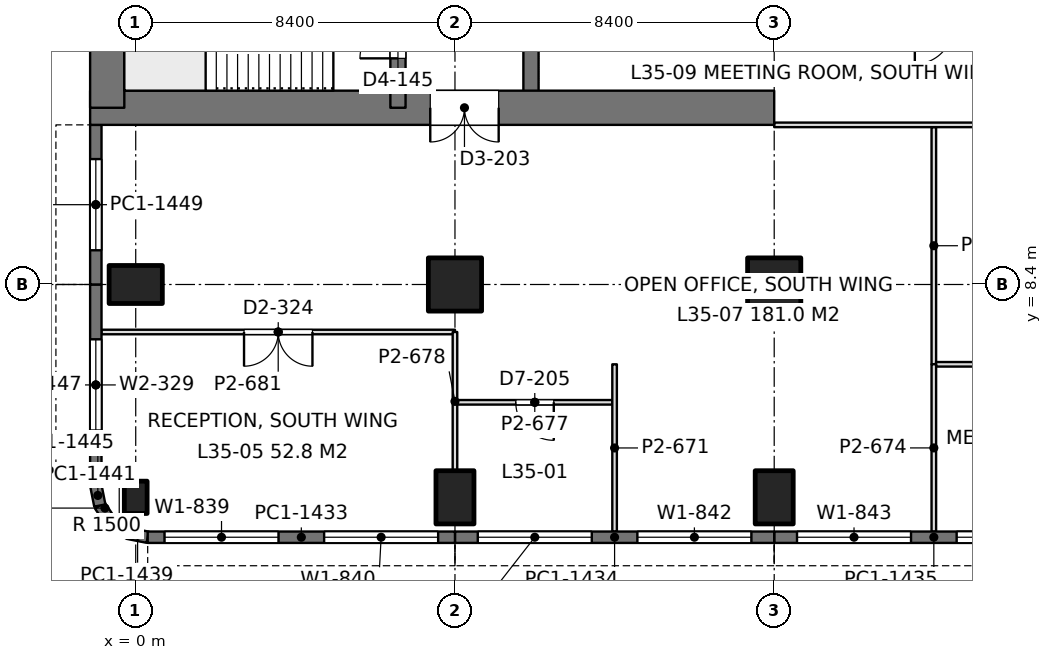
"""IFC4 building model, lengths in metres.
Left out: names, types, materials, properties, quantities, classifications, styles, units other than length and angle.
Written with IfcOpenShell. Run it as: python <this file> out.ifc"""

import sys

from ifc_helpers import new_model, si_unit, direction, frame, frame_2d, origin, origin_2d, place, context, subcontext, project, spatial, rectangle, extrude, element, fill, save


model = new_model("IFC4")
c1 = context("Model", 3, precision=1e-05, world=origin(), true_north=direction((0.0, 1.0)))
c2 = subcontext(c1, "Body", "Model", "MODEL_VIEW")
j1 = project(units=[si_unit("LENGTHUNIT", "METRE"), si_unit("PLANEANGLEUNIT", "RADIAN")], contexts=[c1])
p1 = place(None, origin())
s1 = spatial("IfcSite", under=j1, at=p1, CompositionType="ELEMENT")
p2 = place(p1, origin())
s2 = spatial("IfcBuilding", under=s1, at=p2, CompositionType="ELEMENT")
p3 = place(p2, frame((0.0, 0.0, 155.4)))
s3 = spatial("IfcBuildingStorey", under=s2, at=p3, CompositionType="ELEMENT", Elevation=155.4)
p4 = place(p3, frame((0.0, 2.8, 0.0), z_axis=(0.0, 0.0, 1.0), x_axis=(1.0, 0.0, 0.0)))
e1 = element("IfcColumn", 1, at=p4, inside=s3, PredefinedType="COLUMN", context=c2, shape_type="SweptSolid", body=[
    extrude(rectangle(XDim=0.6, YDim=0.85, at=origin_2d()), origin(), (0.0, 0.0, 1.0), 4.2),
])
for number, where, z_axis, x_axis in (
    (2, (0.0, 8.4, 0.0), (0.0, 0.0, 1.0), (0.0, 1.0, 0.0)),
    (3, (8.4, 2.8, 0.0), (0.0, 0.0, 1.0), (1.0, 0.0, 0.0)),
):
    element("IfcColumn", number, at=place(p3, frame(where, z_axis=z_axis, x_axis=x_axis)), inside=s3, PredefinedType="COLUMN", context=c2, shape_type="SweptSolid", body=[
        extrude(rectangle(XDim=1.0, YDim=1.4, at=origin_2d()), origin(), (0.0, 0.0, 1.0), 4.2),
    ])
p5 = place(p3, frame((8.4, 8.4, 0.0), z_axis=(0.0, 0.0, 1.0), x_axis=(1.0, 0.0, 0.0)))
e4 = element("IfcColumn", 4, at=p5, inside=s3, PredefinedType="COLUMN", context=c2, shape_type="SweptSolid", body=[
    extrude(rectangle(XDim=1.4, YDim=1.4, at=origin_2d()), origin(), (0.0, 0.0, 1.0), 4.2),
])
p6 = place(p3, frame((16.8, 2.8, 0.0), z_axis=(0.0, 0.0, 1.0), x_axis=(1.0, 0.0, 0.0)))
e5 = element("IfcColumn", 5, at=p6, inside=s3, PredefinedType="COLUMN", context=c2, shape_type="SweptSolid", body=[
    extrude(rectangle(XDim=1.0, YDim=1.4, at=origin_2d()), origin(), (0.0, 0.0, 1.0), 4.2),
])
p7 = place(p3, frame((16.8, 8.4, 0.0), z_axis=(0.0, 0.0, 1.0), x_axis=(1.0, 0.0, 0.0)))
e6 = element("IfcColumn", 6, at=p7, inside=s3, PredefinedType="COLUMN", context=c2, shape_type="SweptSolid", body=[
    extrude(rectangle(XDim=1.4, YDim=1.4, at=origin_2d()), origin(), (0.0, 0.0, 1.0), 4.2),
])
p8 = place(p3, frame((-1.2, 13.05, 0.0), z_axis=(0.0, 0.0, 1.0), x_axis=(1.0, 0.0, 0.0)))
e7 = element("IfcWall", 7, at=p8, inside=s3, PredefinedType="SHEAR", context=c2, shape_type="SweptSolid", body=[
    extrude(rectangle(XDim=18.0, YDim=0.9, at=frame_2d((9.0, 0.0))), origin(), (0.0, 0.0, 1.0), 4.2),
])
p9 = place(p8, frame((8.95, 0.0, 0.0)))
e8 = element("IfcOpeningElement", 8, at=p9, cuts=e7, PredefinedType="OPENING", context=c2, shape_type="SweptSolid", body=[
    extrude(rectangle(XDim=1.8, YDim=2.4, at=frame_2d((0.9, 1.2))), frame((0.0, 0.46, 0.0), z_axis=(0.0, -1.0, 0.0), x_axis=(1.0, 0.0, 0.0)), (0.0, 0.0, 1.0), 0.92),
])
p10 = place(p3, frame((-0.75, 13.05, 0.0), z_axis=(0.0, 0.0, 1.0), x_axis=(0.0, 1.0, 0.0)))
e9 = element("IfcWall", 9, at=p10, inside=s3, PredefinedType="SHEAR", context=c2, shape_type="SweptSolid", body=[
    extrude(rectangle(XDim=24.3, YDim=0.9, at=frame_2d((12.15, 0.0))), origin(), (0.0, 0.0, 1.0), 4.2),
])
p11 = place(p3, frame((6.9, 13.05, 0.0), z_axis=(0.0, 0.0, 1.0), x_axis=(0.0, 1.0, 0.0)))
e10 = element("IfcWall", 10, at=p11, inside=s3, PredefinedType="SHEAR", context=c2, shape_type="SweptSolid", body=[
    extrude(rectangle(XDim=24.3, YDim=0.4, at=frame_2d((12.15, 0.0))), origin(), (0.0, 0.0, 1.0), 4.2),
])
p12 = place(p11, frame((1.3, 0.0, 0.0)))
e11 = element("IfcOpeningElement", 11, at=p12, cuts=e10, PredefinedType="OPENING", context=c2, shape_type="SweptSolid", body=[
    extrude(rectangle(XDim=1.0, YDim=2.2, at=frame_2d((0.5, 1.1))), frame((0.0, 0.21, 0.0), z_axis=(0.0, -1.0, 0.0), x_axis=(1.0, 0.0, 0.0)), (0.0, 0.0, 1.0), 0.42),
])
p13 = place(p11, frame((22.0, 0.0, 0.0)))
e12 = element("IfcOpeningElement", 12, at=p13, cuts=e10, PredefinedType="OPENING", context=c2, shape_type="SweptSolid", body=[
    extrude(rectangle(XDim=1.0, YDim=2.2, at=frame_2d((0.5, 1.1))), frame((0.0, 0.21, 0.0), z_axis=(0.0, -1.0, 0.0), x_axis=(1.0, 0.0, 0.0)), (0.0, 0.0, 1.0), 0.42),
])
p14 = place(p11, frame((5.55, 0.0, 0.0)))
e13 = element("IfcOpeningElement", 13, at=p14, cuts=e10, PredefinedType="OPENING", context=c2, shape_type="SweptSolid", body=[
    extrude(rectangle(XDim=1.0, YDim=2.2, at=frame_2d((0.5, 1.1))), frame((0.0, 0.21, 0.0), z_axis=(0.0, -1.0, 0.0), x_axis=(1.0, 0.0, 0.0)), (0.0, 0.0, 1.0), 0.42),
])
p15 = place(p11, frame((9.55, 0.0, 0.0)))
e14 = element("IfcOpeningElement", 14, at=p15, cuts=e10, PredefinedType="OPENING", context=c2, shape_type="SweptSolid", body=[
    extrude(rectangle(XDim=1.0, YDim=2.2, at=frame_2d((0.5, 1.1))), frame((0.0, 0.21, 0.0), z_axis=(0.0, -1.0, 0.0), x_axis=(1.0, 0.0, 0.0)), (0.0, 0.0, 1.0), 0.42),
])
p16 = place(p11, frame((12.8, 0.0, 0.0)))
e15 = element("IfcOpeningElement", 15, at=p16, cuts=e10, PredefinedType="OPENING", context=c2, shape_type="SweptSolid", body=[
    extrude(rectangle(XDim=1.1, YDim=2.2, at=frame_2d((0.55, 1.1))), frame((0.0, 0.21, 0.0), z_axis=(0.0, -1.0, 0.0), x_axis=(1.0, 0.0, 0.0)), (0.0, 0.0, 1.0), 0.42),
])
p17 = place(p11, frame((15.538, 0.0, 0.0)))
e16 = element("IfcOpeningElement", 16, at=p17, cuts=e10, PredefinedType="OPENING", context=c2, shape_type="SweptSolid", body=[
    extrude(rectangle(XDim=1.1, YDim=2.2, at=frame_2d((0.55, 1.1))), frame((0.0, 0.21, 0.0), z_axis=(0.0, -1.0, 0.0), x_axis=(1.0, 0.0, 0.0)), (0.0, 0.0, 1.0), 0.42),
])
p18 = place(p11, frame((18.262, 0.0, 0.0)))
e17 = element("IfcOpeningElement", 17, at=p18, cuts=e10, PredefinedType="OPENING", context=c2, shape_type="SweptSolid", body=[
    extrude(rectangle(XDim=1.1, YDim=2.2, at=frame_2d((0.55, 1.1))), frame((0.0, 0.21, 0.0), z_axis=(0.0, -1.0, 0.0), x_axis=(1.0, 0.0, 0.0)), (0.0, 0.0, 1.0), 0.42),
])
p19 = place(p3, frame((10.4, 13.05, 0.0), z_axis=(0.0, 0.0, 1.0), x_axis=(0.0, 1.0, 0.0)))
e18 = element("IfcWall", 18, at=p19, inside=s3, PredefinedType="SHEAR", context=c2, shape_type="SweptSolid", body=[
    extrude(rectangle(XDim=24.3, YDim=0.4, at=frame_2d((12.15, 0.0))), origin(), (0.0, 0.0, 1.0), 4.2),
])
p20 = place(p19, frame((10.05, 0.0, 0.0)))
e19 = element("IfcOpeningElement", 19, at=p20, cuts=e18, PredefinedType="OPENING", context=c2, shape_type="SweptSolid", body=[
    extrude(rectangle(XDim=1.1, YDim=2.2, at=frame_2d((0.55, 1.1))), frame((0.0, 0.21, 0.0), z_axis=(0.0, -1.0, 0.0), x_axis=(1.0, 0.0, 0.0)), (0.0, 0.0, 1.0), 0.42),
])
p21 = place(p19, frame((12.9, 0.0, 0.0)))
e20 = element("IfcOpeningElement", 20, at=p21, cuts=e18, PredefinedType="OPENING", context=c2, shape_type="SweptSolid", body=[
    extrude(rectangle(XDim=1.1, YDim=2.2, at=frame_2d((0.55, 1.1))), frame((0.0, 0.21, 0.0), z_axis=(0.0, -1.0, 0.0), x_axis=(1.0, 0.0, 0.0)), (0.0, 0.0, 1.0), 0.42),
])
p22 = place(p19, frame((21.45, 0.0, 0.0)))
e21 = element("IfcOpeningElement", 21, at=p22, cuts=e18, PredefinedType="OPENING", context=c2, shape_type="SweptSolid", body=[
    extrude(rectangle(XDim=1.1, YDim=2.2, at=frame_2d((0.55, 1.1))), frame((0.0, 0.21, 0.0), z_axis=(0.0, -1.0, 0.0), x_axis=(1.0, 0.0, 0.0)), (0.0, 0.0, 1.0), 0.42),
])
p23 = place(p19, frame((2.35, 0.0, 0.0)))
e22 = element("IfcOpeningElement", 22, at=p23, cuts=e18, PredefinedType="OPENING", context=c2, shape_type="SweptSolid", body=[
    extrude(rectangle(XDim=1.8, YDim=2.4, at=frame_2d((0.9, 1.2))), frame((0.0, 0.21, 0.0), z_axis=(0.0, -1.0, 0.0), x_axis=(1.0, 0.0, 0.0)), (0.0, 0.0, 1.0), 0.42),
])
p24 = place(p19, frame((5.8, 0.0, 0.0)))
e23 = element("IfcOpeningElement", 23, at=p24, cuts=e18, PredefinedType="OPENING", context=c2, shape_type="SweptSolid", body=[
    extrude(rectangle(XDim=1.8, YDim=2.4, at=frame_2d((0.9, 1.2))), frame((0.0, 0.21, 0.0), z_axis=(0.0, -1.0, 0.0), x_axis=(1.0, 0.0, 0.0)), (0.0, 0.0, 1.0), 0.42),
])
p25 = place(p3, frame((25.2, 1.75, 0.0), z_axis=(0.0, 0.0, 1.0), x_axis=(-1.0, 0.0, 0.0)))
e24 = element("IfcWall", 24, at=p25, inside=s3, PredefinedType="SOLIDWALL", context=c2, shape_type="SweptSolid", body=[
    extrude(rectangle(XDim=8.4, YDim=0.3, at=frame_2d((4.2, 0.0))), origin(), (0.0, 0.0, 1.0), 4.05),
])
p26 = place(p25, frame((0.6, 0.0, 0.9)))
e25 = element("IfcOpeningElement", 25, at=p26, cuts=e24, PredefinedType="OPENING", context=c2, shape_type="SweptSolid", body=[
    extrude(rectangle(XDim=3.0, YDim=1.9, at=frame_2d((1.5, 0.95))), frame((0.0, 0.16, 0.0), z_axis=(0.0, -1.0, 0.0), x_axis=(1.0, 0.0, 0.0)), (0.0, 0.0, 1.0), 0.32),
])
p27 = place(p25, frame((4.8, 0.0, 0.9)))
e26 = element("IfcOpeningElement", 26, at=p27, cuts=e24, PredefinedType="OPENING", context=c2, shape_type="SweptSolid", body=[
    extrude(rectangle(XDim=3.0, YDim=1.9, at=frame_2d((1.5, 0.95))), frame((0.0, 0.16, 0.0), z_axis=(0.0, -1.0, 0.0), x_axis=(1.0, 0.0, 0.0)), (0.0, 0.0, 1.0), 0.32),
])
p28 = place(p3, frame((16.8, 1.75, 0.0), z_axis=(0.0, 0.0, 1.0), x_axis=(-1.0, 0.0, 0.0)))
e27 = element("IfcWall", 27, at=p28, inside=s3, PredefinedType="SOLIDWALL", context=c2, shape_type="SweptSolid", body=[
    extrude(rectangle(XDim=8.4, YDim=0.3, at=frame_2d((4.2, 0.0))), origin(), (0.0, 0.0, 1.0), 4.05),
])
p29 = place(p28, frame((0.6, 0.0, 0.9)))
e28 = element("IfcOpeningElement", 28, at=p29, cuts=e27, PredefinedType="OPENING", context=c2, shape_type="SweptSolid", body=[
    extrude(rectangle(XDim=3.0, YDim=1.9, at=frame_2d((1.5, 0.95))), frame((0.0, 0.16, 0.0), z_axis=(0.0, -1.0, 0.0), x_axis=(1.0, 0.0, 0.0)), (0.0, 0.0, 1.0), 0.32),
])
p30 = place(p28, frame((4.8, 0.0, 0.9)))
e29 = element("IfcOpeningElement", 29, at=p30, cuts=e27, PredefinedType="OPENING", context=c2, shape_type="SweptSolid", body=[
    extrude(rectangle(XDim=3.0, YDim=1.9, at=frame_2d((1.5, 0.95))), frame((0.0, 0.16, 0.0), z_axis=(0.0, -1.0, 0.0), x_axis=(1.0, 0.0, 0.0)), (0.0, 0.0, 1.0), 0.32),
])
p31 = place(p3, frame((8.4, 1.75, 0.0), z_axis=(0.0, 0.0, 1.0), x_axis=(-1.0, 0.0, 0.0)))
e30 = element("IfcWall", 30, at=p31, inside=s3, PredefinedType="SOLIDWALL", context=c2, shape_type="SweptSolid", body=[
    extrude(rectangle(XDim=8.085, YDim=0.3, at=frame_2d((4.042, 0.0))), origin(), (0.0, 0.0, 1.0), 4.05),
])
p32 = place(p31, frame((0.443, 0.0, 0.9)))
e31 = element("IfcOpeningElement", 31, at=p32, cuts=e30, PredefinedType="OPENING", context=c2, shape_type="SweptSolid", body=[
    extrude(rectangle(XDim=3.0, YDim=1.9, at=frame_2d((1.5, 0.95))), frame((0.0, 0.16, 0.0), z_axis=(0.0, -1.0, 0.0), x_axis=(1.0, 0.0, 0.0)), (0.0, 0.0, 1.0), 0.32),
])
p33 = place(p31, frame((4.643, 0.0, 0.9)))
e32 = element("IfcOpeningElement", 32, at=p33, cuts=e30, PredefinedType="OPENING", context=c2, shape_type="SweptSolid", body=[
    extrude(rectangle(XDim=3.0, YDim=1.9, at=frame_2d((1.5, 0.95))), frame((0.0, 0.16, 0.0), z_axis=(0.0, -1.0, 0.0), x_axis=(1.0, 0.0, 0.0)), (0.0, 0.0, 1.0), 0.32),
])
p34 = place(p3, frame((0.315, 1.75, 0.0), z_axis=(0.0, 0.0, 1.0), x_axis=(-0.980788534345, 0.195073962632, 0.0)))
e33 = element("IfcWall", 33, at=p34, inside=s3, PredefinedType="SOLIDWALL", context=c2, shape_type="SweptSolid", body=[
    extrude(rectangle(XDim=0.541, YDim=0.3, at=frame_2d((0.271, 0.0))), origin(), (0.0, 0.0, 1.0), 4.05),
])
for number, where, z_axis, x_axis in (
    (34, (-0.216, 1.855, 0.0), (0.0, 0.0, 1.0), (-0.831, 0.556, 0.0)),
    (35, (-0.653, 2.147, 0.0), (0.0, 0.0, 1.0), (-0.556, 0.831, 0.0)),
):
    element("IfcWall", number, at=place(p3, frame(where, z_axis=z_axis, x_axis=x_axis)), inside=s3, PredefinedType="SOLIDWALL", context=c2, shape_type="SweptSolid", body=[
        extrude(rectangle(XDim=0.526, YDim=0.3, at=frame_2d((0.263, 0.0))), origin(), (0.0, 0.0, 1.0), 4.05),
    ])
p35 = place(p3, frame((-0.945, 2.584, 0.0), z_axis=(0.0, 0.0, 1.0), x_axis=(-0.195073962632, 0.980788534345, 0.0)))
e36 = element("IfcWall", 36, at=p35, inside=s3, PredefinedType="SOLIDWALL", context=c2, shape_type="SweptSolid", body=[
    extrude(rectangle(XDim=0.541, YDim=0.3, at=frame_2d((0.271, 0.0))), origin(), (0.0, 0.0, 1.0), 4.05),
])
p36 = place(p3, frame((-1.05, 3.115, 0.0), z_axis=(0.0, 0.0, 1.0), x_axis=(0.0, 1.0, 0.0)))
e37 = element("IfcWall", 37, at=p36, inside=s3, PredefinedType="SOLIDWALL", context=c2, shape_type="SweptSolid", body=[
    extrude(rectangle(XDim=5.285, YDim=0.3, at=frame_2d((2.643, 0.0))), origin(), (0.0, 0.0, 1.0), 4.05),
])
p37 = place(p36, frame((1.443, 0.0, 0.9)))
e38 = element("IfcOpeningElement", 38, at=p37, cuts=e37, PredefinedType="OPENING", context=c2, shape_type="SweptSolid", body=[
    extrude(rectangle(XDim=2.4, YDim=1.9, at=frame_2d((1.2, 0.95))), frame((0.0, 0.16, 0.0), z_axis=(0.0, -1.0, 0.0), x_axis=(1.0, 0.0, 0.0)), (0.0, 0.0, 1.0), 0.32),
])
p38 = place(p3, frame((-1.05, 8.4, 0.0), z_axis=(0.0, 0.0, 1.0), x_axis=(0.0, 1.0, 0.0)))
e39 = element("IfcWall", 39, at=p38, inside=s3, PredefinedType="SOLIDWALL", context=c2, shape_type="SweptSolid", body=[
    extrude(rectangle(XDim=4.2, YDim=0.3, at=frame_2d((2.1, 0.0))), origin(), (0.0, 0.0, 1.0), 4.05),
])
p39 = place(p38, frame((0.9, 0.0, 0.9)))
e40 = element("IfcOpeningElement", 40, at=p39, cuts=e39, PredefinedType="OPENING", context=c2, shape_type="SweptSolid", body=[
    extrude(rectangle(XDim=2.4, YDim=1.9, at=frame_2d((1.2, 0.95))), frame((0.0, 0.16, 0.0), z_axis=(0.0, -1.0, 0.0), x_axis=(1.0, 0.0, 0.0)), (0.0, 0.0, 1.0), 0.32),
])
p40 = place(p3, frame((-0.902, 7.15, 0.0), z_axis=(0.0, 0.0, 1.0), x_axis=(1.0, 0.0, 0.0)))
e41 = element("IfcWall", 41, at=p40, inside=s3, PredefinedType="PARTITIONING", context=c2, shape_type="SweptSolid", body=[
    extrude(rectangle(XDim=9.302, YDim=0.12, at=frame_2d((4.651, 0.0))), origin(), (0.0, 0.0, 1.0), 3.55),
])
p41 = place(p40, frame((3.752, 0.0, 0.0)))
e42 = element("IfcOpeningElement", 42, at=p41, cuts=e41, PredefinedType="OPENING", context=c2, shape_type="SweptSolid", body=[
    extrude(rectangle(XDim=1.8, YDim=2.2, at=frame_2d((0.9, 1.1))), frame((0.0, 0.07, 0.0), z_axis=(0.0, -1.0, 0.0), x_axis=(1.0, 0.0, 0.0)), (0.0, 0.0, 1.0), 0.14),
])
p42 = place(p3, frame((8.458, 5.3, 0.0), z_axis=(0.0, 0.0, 1.0), x_axis=(1.0, 0.0, 0.0)))
e43 = element("IfcWall", 43, at=p42, inside=s3, PredefinedType="PARTITIONING", context=c2, shape_type="SweptSolid", body=[
    extrude(rectangle(XDim=4.084, YDim=0.12, at=frame_2d((2.042, 0.0))), origin(), (0.0, 0.0, 1.0), 3.55),
])
p43 = place(p42, frame((1.542, 0.0, 0.0)))
e44 = element("IfcOpeningElement", 44, at=p43, cuts=e43, PredefinedType="OPENING", context=c2, shape_type="SweptSolid", body=[
    extrude(rectangle(XDim=1.0, YDim=2.4, at=frame_2d((0.5, 1.2))), frame((0.0, 0.07, 0.0), z_axis=(0.0, -1.0, 0.0), x_axis=(1.0, 0.0, 0.0)), (0.0, 0.0, 1.0), 0.14),
])
p44 = place(p3, frame((8.4, 3.499, 0.0), z_axis=(0.0, 0.0, 1.0), x_axis=(0.0, 1.0, 0.0)))
e45 = element("IfcWall", 45, at=p44, inside=s3, PredefinedType="PARTITIONING", context=c2, shape_type="SweptSolid", body=[
    extrude(rectangle(XDim=3.651, YDim=0.12, at=frame_2d((1.825, 0.0))), origin(), (0.0, 0.0, 1.0), 3.55),
])
p45 = place(p3, frame((12.6, 1.898, 0.0), z_axis=(0.0, 0.0, 1.0), x_axis=(0.0, 1.0, 0.0)))
e46 = element("IfcWall", 46, at=p45, inside=s3, PredefinedType="PARTITIONING", context=c2, shape_type="SweptSolid", body=[
    extrude(rectangle(XDim=4.402, YDim=0.12, at=frame_2d((2.201, 0.0))), origin(), (0.0, 0.0, 1.0), 3.56),
])
p46 = place(p3, frame((21.058, 6.3, 0.0), z_axis=(0.0, 0.0, 1.0), x_axis=(1.0, 0.0, 0.0)))
e47 = element("IfcWall", 47, at=p46, inside=s3, PredefinedType="PARTITIONING", context=c2, shape_type="SweptSolid", body=[
    extrude(rectangle(XDim=8.342, YDim=0.12, at=frame_2d((4.171, 0.0))), origin(), (0.0, 0.0, 1.0), 3.55),
])
p47 = place(p46, frame((1.142, 0.0, 0.0)))
e48 = element("IfcOpeningElement", 48, at=p47, cuts=e47, PredefinedType="OPENING", context=c2, shape_type="SweptSolid", body=[
    extrude(rectangle(XDim=1.8, YDim=2.2, at=frame_2d((0.9, 1.1))), frame((0.0, 0.07, 0.0), z_axis=(0.0, -1.0, 0.0), x_axis=(1.0, 0.0, 0.0)), (0.0, 0.0, 1.0), 0.14),
])
p48 = place(p3, frame((21.0, 1.898, 0.0), z_axis=(0.0, 0.0, 1.0), x_axis=(0.0, 1.0, 0.0)))
e49 = element("IfcWall", 49, at=p48, inside=s3, PredefinedType="PARTITIONING", context=c2, shape_type="SweptSolid", body=[
    extrude(rectangle(XDim=4.404, YDim=0.12, at=frame_2d((2.202, 0.0))), origin(), (0.0, 0.0, 1.0), 3.56),
])
p49 = place(p3, frame((21.0, 6.298, 0.0), z_axis=(0.0, 0.0, 1.0), x_axis=(0.0, 1.0, 0.0)))
e50 = element("IfcWall", 50, at=p49, inside=s3, PredefinedType="PARTITIONING", context=c2, shape_type="SweptSolid", body=[
    extrude(rectangle(XDim=6.244, YDim=0.12, at=frame_2d((3.122, 0.0))), origin(), (0.0, 0.0, 1.0), 3.55),
])
p50 = place(p3, frame((16.8, 12.6, 0.0), z_axis=(0.0, 0.0, 1.0), x_axis=(1.0, 0.0, 0.0)))
e51 = element("IfcWall", 51, at=p50, inside=s3, PredefinedType="PARTITIONING", context=c2, shape_type="SweptSolid", body=[
    extrude(rectangle(XDim=16.8, YDim=0.12, at=frame_2d((8.4, 0.0))), origin(), (0.0, 0.0, 1.0), 3.55),
])
p51 = place(p26, origin())
e52 = element("IfcWindow", 52, at=p51, inside=s3, PartitioningType="SINGLE_PANEL", PredefinedType="WINDOW", context=c2, shape_type="SweptSolid", body=[
    extrude(rectangle(XDim=3.0, YDim=1.9, at=frame_2d((1.5, 0.95))), frame((0.0, 0.03, 0.0), z_axis=(0.0, -1.0, 0.0), x_axis=(1.0, 0.0, 0.0)), (0.0, 0.0, 1.0), 0.06),
])
fill(e25, e52)
p52 = place(p27, origin())
e53 = element("IfcWindow", 53, at=p52, inside=s3, PartitioningType="SINGLE_PANEL", PredefinedType="WINDOW", context=c2, shape_type="SweptSolid", body=[
    extrude(rectangle(XDim=3.0, YDim=1.9, at=frame_2d((1.5, 0.95))), frame((0.0, 0.03, 0.0), z_axis=(0.0, -1.0, 0.0), x_axis=(1.0, 0.0, 0.0)), (0.0, 0.0, 1.0), 0.06),
])
fill(e26, e53)
p53 = place(p29, origin())
e54 = element("IfcWindow", 54, at=p53, inside=s3, PartitioningType="SINGLE_PANEL", PredefinedType="WINDOW", context=c2, shape_type="SweptSolid", body=[
    extrude(rectangle(XDim=3.0, YDim=1.9, at=frame_2d((1.5, 0.95))), frame((0.0, 0.03, 0.0), z_axis=(0.0, -1.0, 0.0), x_axis=(1.0, 0.0, 0.0)), (0.0, 0.0, 1.0), 0.06),
])
fill(e28, e54)
p54 = place(p30, origin())
e55 = element("IfcWindow", 55, at=p54, inside=s3, PartitioningType="SINGLE_PANEL", PredefinedType="WINDOW", context=c2, shape_type="SweptSolid", body=[
    extrude(rectangle(XDim=3.0, YDim=1.9, at=frame_2d((1.5, 0.95))), frame((0.0, 0.03, 0.0), z_axis=(0.0, -1.0, 0.0), x_axis=(1.0, 0.0, 0.0)), (0.0, 0.0, 1.0), 0.06),
])
fill(e29, e55)
p55 = place(p32, origin())
e56 = element("IfcWindow", 56, at=p55, inside=s3, PartitioningType="SINGLE_PANEL", PredefinedType="WINDOW", context=c2, shape_type="SweptSolid", body=[
    extrude(rectangle(XDim=3.0, YDim=1.9, at=frame_2d((1.5, 0.95))), frame((0.0, 0.03, 0.0), z_axis=(0.0, -1.0, 0.0), x_axis=(1.0, 0.0, 0.0)), (0.0, 0.0, 1.0), 0.06),
])
fill(e31, e56)
p56 = place(p33, origin())
e57 = element("IfcWindow", 57, at=p56, inside=s3, PartitioningType="SINGLE_PANEL", PredefinedType="WINDOW", context=c2, shape_type="SweptSolid", body=[
    extrude(rectangle(XDim=3.0, YDim=1.9, at=frame_2d((1.5, 0.95))), frame((0.0, 0.03, 0.0), z_axis=(0.0, -1.0, 0.0), x_axis=(1.0, 0.0, 0.0)), (0.0, 0.0, 1.0), 0.06),
])
fill(e32, e57)
p57 = place(p37, origin())
e58 = element("IfcWindow", 58, at=p57, inside=s3, PartitioningType="SINGLE_PANEL", PredefinedType="WINDOW", context=c2, shape_type="SweptSolid", body=[
    extrude(rectangle(XDim=2.4, YDim=1.9, at=frame_2d((1.2, 0.95))), frame((0.0, 0.03, 0.0), z_axis=(0.0, -1.0, 0.0), x_axis=(1.0, 0.0, 0.0)), (0.0, 0.0, 1.0), 0.06),
])
fill(e38, e58)
p58 = place(p39, origin())
e59 = element("IfcWindow", 59, at=p58, inside=s3, PartitioningType="SINGLE_PANEL", PredefinedType="WINDOW", context=c2, shape_type="SweptSolid", body=[
    extrude(rectangle(XDim=2.4, YDim=1.9, at=frame_2d((1.2, 0.95))), frame((0.0, 0.03, 0.0), z_axis=(0.0, -1.0, 0.0), x_axis=(1.0, 0.0, 0.0)), (0.0, 0.0, 1.0), 0.06),
])
fill(e40, e59)
p59 = place(p9, frame((1.8, 0.0, 0.0), z_axis=(0.0, 0.0, 1.0), x_axis=(-1.0, 0.0, 0.0)))
e60 = element("IfcDoor", 60, at=p59, inside=s3, OperationType="DOUBLE_DOOR_SINGLE_SWING", PredefinedType="DOOR", context=c2, shape_type="SweptSolid", body=[
    extrude(rectangle(XDim=1.8, YDim=2.4, at=frame_2d((0.9, 1.2))), frame((0.0, 0.025, 0.0), z_axis=(0.0, -1.0, 0.0), x_axis=(1.0, 0.0, 0.0)), (0.0, 0.0, 1.0), 0.05),
])
fill(e8, e60)
p60 = place(p12, origin())
e61 = element("IfcDoor", 61, at=p60, inside=s3, OperationType="SINGLE_SWING_LEFT", PredefinedType="DOOR", context=c2, shape_type="SweptSolid", body=[
    extrude(rectangle(XDim=1.0, YDim=2.2, at=frame_2d((0.5, 1.1))), frame((0.0, 0.025, 0.0), z_axis=(0.0, -1.0, 0.0), x_axis=(1.0, 0.0, 0.0)), (0.0, 0.0, 1.0), 0.05),
])
fill(e11, e61)
p61 = place(p41, frame((1.8, 0.0, 0.0), z_axis=(0.0, 0.0, 1.0), x_axis=(-1.0, 0.0, 0.0)))
e62 = element("IfcDoor", 62, at=p61, inside=s3, OperationType="DOUBLE_DOOR_SINGLE_SWING", PredefinedType="DOOR", context=c2, shape_type="SweptSolid", body=[
    extrude(rectangle(XDim=1.8, YDim=2.2, at=frame_2d((0.9, 1.1))), frame((0.0, 0.025, 0.0), z_axis=(0.0, -1.0, 0.0), x_axis=(1.0, 0.0, 0.0)), (0.0, 0.0, 1.0), 0.05),
])
fill(e42, e62)
p62 = place(p43, frame((1.0, 0.0, 0.0), z_axis=(0.0, 0.0, 1.0), x_axis=(-1.0, 0.0, 0.0)))
e63 = element("IfcDoor", 63, at=p62, inside=s3, OperationType="SINGLE_SWING_LEFT", PredefinedType="DOOR", context=c2, shape_type="SweptSolid", body=[
    extrude(rectangle(XDim=1.0, YDim=2.4, at=frame_2d((0.5, 1.2))), frame((0.0, 0.025, 0.0), z_axis=(0.0, -1.0, 0.0), x_axis=(1.0, 0.0, 0.0)), (0.0, 0.0, 1.0), 0.05),
])
fill(e44, e63)
save(model, sys.argv[1])
